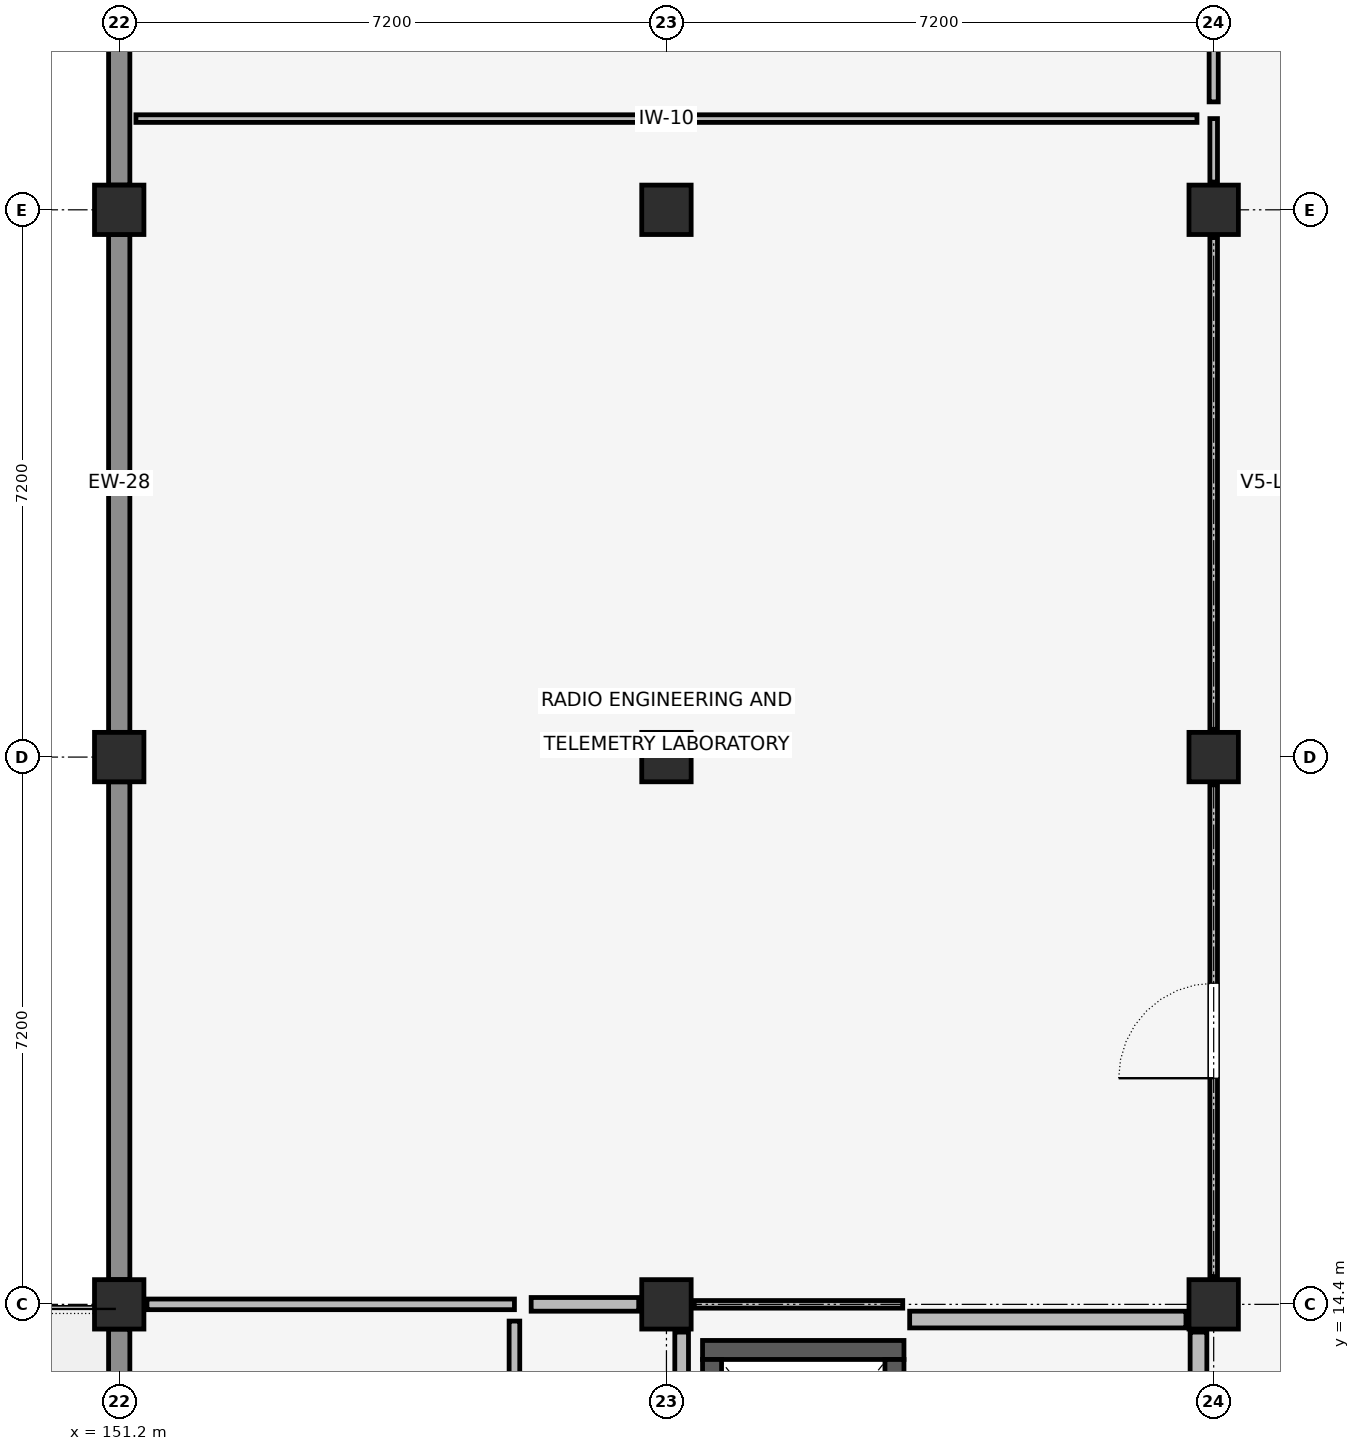
"""IFC4 building model, lengths in metres.
Left out: names, types, materials, properties, quantities, classifications, styles, units other than length and angle.
Written with IfcOpenShell. Run it as: python <this file> out.ifc"""

import sys

from ifc_helpers import new_model, si_unit, direction, frame, frame_2d, origin, origin_2d, place, context, subcontext, project, spatial, rectangle, extrude, element, fill, save


model = new_model("IFC4")
c1 = context("Model", 3, precision=1e-05, world=origin(), true_north=direction((0.0, 1.0)))
c2 = subcontext(c1, "Body", "Model", "MODEL_VIEW")
j1 = project(units=[si_unit("LENGTHUNIT", "METRE"), si_unit("PLANEANGLEUNIT", "RADIAN")], contexts=[c1])
p1 = place(None, origin())
s1 = spatial("IfcSite", under=j1, at=p1, CompositionType="ELEMENT")
p2 = place(p1, origin())
s2 = spatial("IfcBuilding", under=s1, at=p2, CompositionType="ELEMENT")
p3 = place(p2, frame((0.0, 0.0, 13.5)))
s3 = spatial("IfcBuildingStorey", under=s2, at=p3, CompositionType="ELEMENT", Elevation=13.5)
for number, where, z_axis, x_axis in (
    (1, (151.2, 14.4, 0.0), (0.0, 0.0, 1.0), (1.0, 0.0, 0.0)),
    (2, (151.2, 21.6, 0.0), (0.0, 0.0, 1.0), (1.0, 0.0, 0.0)),
    (3, (151.2, 28.8, 0.0), (0.0, 0.0, 1.0), (1.0, 0.0, 0.0)),
    (4, (158.4, 14.4, 0.0), (0.0, 0.0, 1.0), (1.0, 0.0, 0.0)),
    (5, (158.4, 21.6, 0.0), (0.0, 0.0, 1.0), (1.0, 0.0, 0.0)),
    (6, (158.4, 28.8, 0.0), (0.0, 0.0, 1.0), (1.0, 0.0, 0.0)),
    (7, (165.6, 14.4, 0.0), (0.0, 0.0, 1.0), (1.0, 0.0, 0.0)),
    (8, (165.6, 21.6, 0.0), (0.0, 0.0, 1.0), (1.0, 0.0, 0.0)),
    (9, (165.6, 28.8, 0.0), (0.0, 0.0, 1.0), (1.0, 0.0, 0.0)),
):
    element("IfcColumn", number, at=place(p3, frame(where, z_axis=z_axis, x_axis=x_axis)), inside=s3, PredefinedType="COLUMN", context=c2, shape_type="SweptSolid", body=[
        extrude(rectangle(XDim=0.65, YDim=0.65, at=origin_2d()), origin(), (0.0, 0.0, 1.0), 3.9),
    ])
p4 = place(p3, frame((158.875, 13.8, 0.0), z_axis=(0.0, 0.0, 1.0), x_axis=(1.0, 0.0, 0.0)))
e10 = element("IfcWall", 10, at=p4, inside=s3, PredefinedType="SHEAR", context=c2, shape_type="SweptSolid", body=[
    extrude(rectangle(XDim=2.65, YDim=0.25, at=frame_2d((1.325, 0.0))), origin(), (0.0, 0.0, 1.0), 3.62),
])
p5 = place(p3, frame((159.0, 10.925, 0.0), z_axis=(0.0, 0.0, 1.0), x_axis=(0.0, 1.0, 0.0)))
e11 = element("IfcWall", 11, at=p5, inside=s3, PredefinedType="SHEAR", context=c2, shape_type="SweptSolid", body=[
    extrude(rectangle(XDim=2.75, YDim=0.25, at=frame_2d((1.375, 0.0))), origin(), (0.0, 0.0, 1.0), 3.62),
])
p6 = place(p3, frame((161.4, 10.925, 0.0), z_axis=(0.0, 0.0, 1.0), x_axis=(0.0, 1.0, 0.0)))
e12 = element("IfcWall", 12, at=p6, inside=s3, PredefinedType="SHEAR", context=c2, shape_type="SweptSolid", body=[
    extrude(rectangle(XDim=2.75, YDim=0.25, at=frame_2d((1.375, 0.0))), origin(), (0.0, 0.0, 1.0), 3.62),
])
p7 = place(p6, frame((0.825, 0.0, 0.0)))
e13 = element("IfcOpeningElement", 13, at=p7, cuts=e12, PredefinedType="OPENING", context=c2, shape_type="SweptSolid", body=[
    extrude(rectangle(XDim=1.1, YDim=2.15, at=frame_2d((0.55, 1.075))), frame((0.0, 0.137, 0.0), z_axis=(0.0, -1.0, 0.0), x_axis=(1.0, 0.0, 0.0)), (0.0, 0.0, 1.0), 0.274),
])
p8 = place(p3, frame((151.2, 35.675, 0.0), z_axis=(0.0, 0.0, 1.0), x_axis=(0.0, -1.0, 0.0)))
e14 = element("IfcWall", 14, at=p8, inside=s3, PredefinedType="ELEMENTEDWALL", context=c2, shape_type="SweptSolid", body=[
    extrude(rectangle(XDim=6.55, YDim=0.28, at=frame_2d((3.275, 0.0))), origin(), (0.0, 0.0, 1.0), 2.96),
])
p9 = place(p3, frame((151.2, 28.475, 0.0), z_axis=(0.0, 0.0, 1.0), x_axis=(0.0, -1.0, 0.0)))
e15 = element("IfcWall", 15, at=p9, inside=s3, PredefinedType="ELEMENTEDWALL", context=c2, shape_type="SweptSolid", body=[
    extrude(rectangle(XDim=6.55, YDim=0.28, at=frame_2d((3.275, 0.0))), origin(), (0.0, 0.0, 1.0), 3.01),
])
p10 = place(p3, frame((151.2, 21.275, 0.0), z_axis=(0.0, 0.0, 1.0), x_axis=(0.0, -1.0, 0.0)))
e16 = element("IfcWall", 16, at=p10, inside=s3, PredefinedType="ELEMENTEDWALL", context=c2, shape_type="SweptSolid", body=[
    extrude(rectangle(XDim=6.55, YDim=0.28, at=frame_2d((3.275, 0.0))), origin(), (0.0, 0.0, 1.0), 2.96),
])
p11 = place(p3, frame((151.2, 14.075, 0.0), z_axis=(0.0, 0.0, 1.0), x_axis=(0.0, -1.0, 0.0)))
e17 = element("IfcWall", 17, at=p11, inside=s3, PredefinedType="ELEMENTEDWALL", context=c2, shape_type="SweptSolid", body=[
    extrude(rectangle(XDim=6.55, YDim=0.28, at=frame_2d((3.275, 0.0))), origin(), (0.0, 0.0, 1.0), 3.01),
])
p12 = place(p11, frame((2.525, 0.0, 0.0)))
e18 = element("IfcOpeningElement", 18, at=p12, cuts=e17, PredefinedType="OPENING", context=c2, shape_type="SweptSolid", body=[
    extrude(rectangle(XDim=1.5, YDim=2.2, at=frame_2d((0.75, 1.1))), frame((0.0, 0.152, 0.0), z_axis=(0.0, -1.0, 0.0), x_axis=(1.0, 0.0, 0.0)), (0.0, 0.0, 1.0), 0.304),
])
p13 = place(p3, frame((165.4, 9.2, 0.0), z_axis=(0.0, 0.0, 1.0), x_axis=(0.0, 1.0, 0.0)))
e19 = element("IfcWall", 19, at=p13, inside=s3, PredefinedType="STANDARD", context=c2, shape_type="SweptSolid", body=[
    extrude(rectangle(XDim=4.835, YDim=0.22, at=frame_2d((2.417, 0.0))), origin(), (0.0, 0.0, 1.0), 3.008),
])
p14 = place(p13, frame((1.817, 0.0, 0.0)))
e20 = element("IfcOpeningElement", 20, at=p14, cuts=e19, PredefinedType="OPENING", context=c2, shape_type="SweptSolid", body=[
    extrude(rectangle(XDim=1.2, YDim=2.2, at=frame_2d((0.6, 1.1))), frame((0.0, 0.122, 0.0), z_axis=(0.0, -1.0, 0.0), x_axis=(1.0, 0.0, 0.0)), (0.0, 0.0, 1.0), 0.244),
])
p15 = place(p3, frame((161.6, 14.2, 0.0), z_axis=(0.0, 0.0, 1.0), x_axis=(1.0, 0.0, 0.0)))
e21 = element("IfcWall", 21, at=p15, inside=s3, PredefinedType="STANDARD", context=c2, shape_type="SweptSolid", body=[
    extrude(rectangle(XDim=3.635, YDim=0.22, at=frame_2d((1.817, 0.0))), origin(), (0.0, 0.0, 1.0), 2.908),
])
p16 = place(p3, frame((151.565, 14.4, 0.0), z_axis=(0.0, 0.0, 1.0), x_axis=(1.0, 0.0, 0.0)))
e22 = element("IfcWall", 22, at=p16, inside=s3, PredefinedType="PARTITIONING", context=c2, shape_type="SweptSolid", body=[
    extrude(rectangle(XDim=4.835, YDim=0.14, at=frame_2d((2.417, 0.0))), origin(), (0.0, 0.0, 1.0), 2.858),
])
p17 = place(p3, frame((156.4, 9.42, 0.0), z_axis=(0.0, 0.0, 1.0), x_axis=(0.0, 1.0, 0.0)))
e23 = element("IfcWall", 23, at=p17, inside=s3, PredefinedType="PARTITIONING", context=c2, shape_type="SweptSolid", body=[
    extrude(rectangle(XDim=4.76, YDim=0.14, at=frame_2d((2.38, 0.0))), origin(), (0.0, 0.0, 1.0), 2.858),
])
p18 = place(p17, frame((1.94, 0.0, 0.0)))
e24 = element("IfcOpeningElement", 24, at=p18, cuts=e23, PredefinedType="OPENING", context=c2, shape_type="SweptSolid", body=[
    extrude(rectangle(XDim=0.88, YDim=2.08, at=frame_2d((0.44, 1.04))), frame((0.0, 0.082, 0.0), z_axis=(0.0, -1.0, 0.0), x_axis=(1.0, 0.0, 0.0)), (0.0, 0.0, 1.0), 0.164),
])
p19 = place(p3, frame((156.62, 14.4, 0.0), z_axis=(0.0, 0.0, 1.0), x_axis=(1.0, 0.0, 0.0)))
e25 = element("IfcWall", 25, at=p19, inside=s3, PredefinedType="PLUMBINGWALL", context=c2, shape_type="SweptSolid", body=[
    extrude(rectangle(XDim=1.415, YDim=0.18, at=frame_2d((0.708, 0.0))), origin(), (0.0, 0.0, 1.0), 2.858),
])
p20 = place(p3, frame((158.6, 9.42, 0.0), z_axis=(0.0, 0.0, 1.0), x_axis=(0.0, 1.0, 0.0)))
e26 = element("IfcWall", 26, at=p20, inside=s3, PredefinedType="PLUMBINGWALL", context=c2, shape_type="SweptSolid", body=[
    extrude(rectangle(XDim=4.615, YDim=0.18, at=frame_2d((2.308, 0.0))), origin(), (0.0, 0.0, 1.0), 3.008),
])
p21 = place(p3, frame((165.6, 14.765, 0.0), z_axis=(0.0, 0.0, 1.0), x_axis=(0.0, 1.0, 0.0)))
e27 = element("IfcWall", 27, at=p21, inside=s3, PredefinedType="PARTITIONING", context=c2, shape_type="SweptSolid", body=[
    extrude(rectangle(XDim=6.47, YDim=0.1, at=frame_2d((3.235, 0.0))), origin(), (0.0, 0.0, 1.0), 2.958),
])
p22 = place(p21, frame((2.61, 0.0, 0.0)))
e28 = element("IfcOpeningElement", 28, at=p22, cuts=e27, PredefinedType="OPENING", context=c2, shape_type="SweptSolid", body=[
    extrude(rectangle(XDim=1.25, YDim=2.15, at=frame_2d((0.625, 1.075))), frame((0.0, 0.062, 0.0), z_axis=(0.0, -1.0, 0.0), x_axis=(1.0, 0.0, 0.0)), (0.0, 0.0, 1.0), 0.124),
])
p23 = place(p3, frame((165.6, 21.965, 0.0), z_axis=(0.0, 0.0, 1.0), x_axis=(0.0, 1.0, 0.0)))
e29 = element("IfcWall", 29, at=p23, inside=s3, PredefinedType="PARTITIONING", context=c2, shape_type="SweptSolid", body=[
    extrude(rectangle(XDim=6.47, YDim=0.1, at=frame_2d((3.235, 0.0))), origin(), (0.0, 0.0, 1.0), 3.008),
])
p24 = place(p3, frame((165.6, 29.165, 0.0), z_axis=(0.0, 0.0, 1.0), x_axis=(0.0, 1.0, 0.0)))
e30 = element("IfcWall", 30, at=p24, inside=s3, PredefinedType="PARTITIONING", context=c2, shape_type="SweptSolid", body=[
    extrude(rectangle(XDim=0.835, YDim=0.1, at=frame_2d((0.417, 0.0))), origin(), (0.0, 0.0, 1.0), 2.958),
])
p25 = place(p3, frame((158.765, 14.4, 0.0), z_axis=(0.0, 0.0, 1.0), x_axis=(1.0, 0.0, 0.0)))
e31 = element("IfcWall", 31, at=p25, inside=s3, PredefinedType="PARTITIONING", context=c2, shape_type="SweptSolid", body=[
    extrude(rectangle(XDim=2.744, YDim=0.1, at=frame_2d((1.372, 0.0))), origin(), (0.0, 0.0, 1.0), 2.908),
])
p26 = place(p3, frame((151.42, 30.0, 0.0), z_axis=(0.0, 0.0, 1.0), x_axis=(1.0, 0.0, 0.0)))
e32 = element("IfcWall", 32, at=p26, inside=s3, PredefinedType="PARTITIONING", context=c2, shape_type="SweptSolid", body=[
    extrude(rectangle(XDim=13.96, YDim=0.1, at=frame_2d((6.98, 0.0))), origin(), (0.0, 0.0, 1.0), 2.958),
])
p27 = place(p3, frame((165.6, 30.22, 0.0), z_axis=(0.0, 0.0, 1.0), x_axis=(0.0, 1.0, 0.0)))
e33 = element("IfcWall", 33, at=p27, inside=s3, PredefinedType="PARTITIONING", context=c2, shape_type="SweptSolid", body=[
    extrude(rectangle(XDim=5.415, YDim=0.12, at=frame_2d((2.708, 0.0))), origin(), (0.0, 0.0, 1.0), 2.958),
])
p28 = place(p27, frame((2.208, 0.0, 0.0)))
e34 = element("IfcOpeningElement", 34, at=p28, cuts=e33, PredefinedType="OPENING", context=c2, shape_type="SweptSolid", body=[
    extrude(rectangle(XDim=1.0, YDim=2.15, at=frame_2d((0.5, 1.075))), frame((0.0, 0.072, 0.0), z_axis=(0.0, -1.0, 0.0), x_axis=(1.0, 0.0, 0.0)), (0.0, 0.0, 1.0), 0.144),
])
p29 = place(p22, origin())
e35 = element("IfcDoor", 35, at=p29, inside=s3, OperationType="SINGLE_SWING_LEFT", PredefinedType="DOOR", context=c2, shape_type="SweptSolid", body=[
    extrude(rectangle(XDim=1.25, YDim=2.15, at=frame_2d((0.625, 1.075))), frame((0.0, 0.025, 0.0), z_axis=(0.0, -1.0, 0.0), x_axis=(1.0, 0.0, 0.0)), (0.0, 0.0, 1.0), 0.05),
])
fill(e28, e35)
save(model, sys.argv[1])
